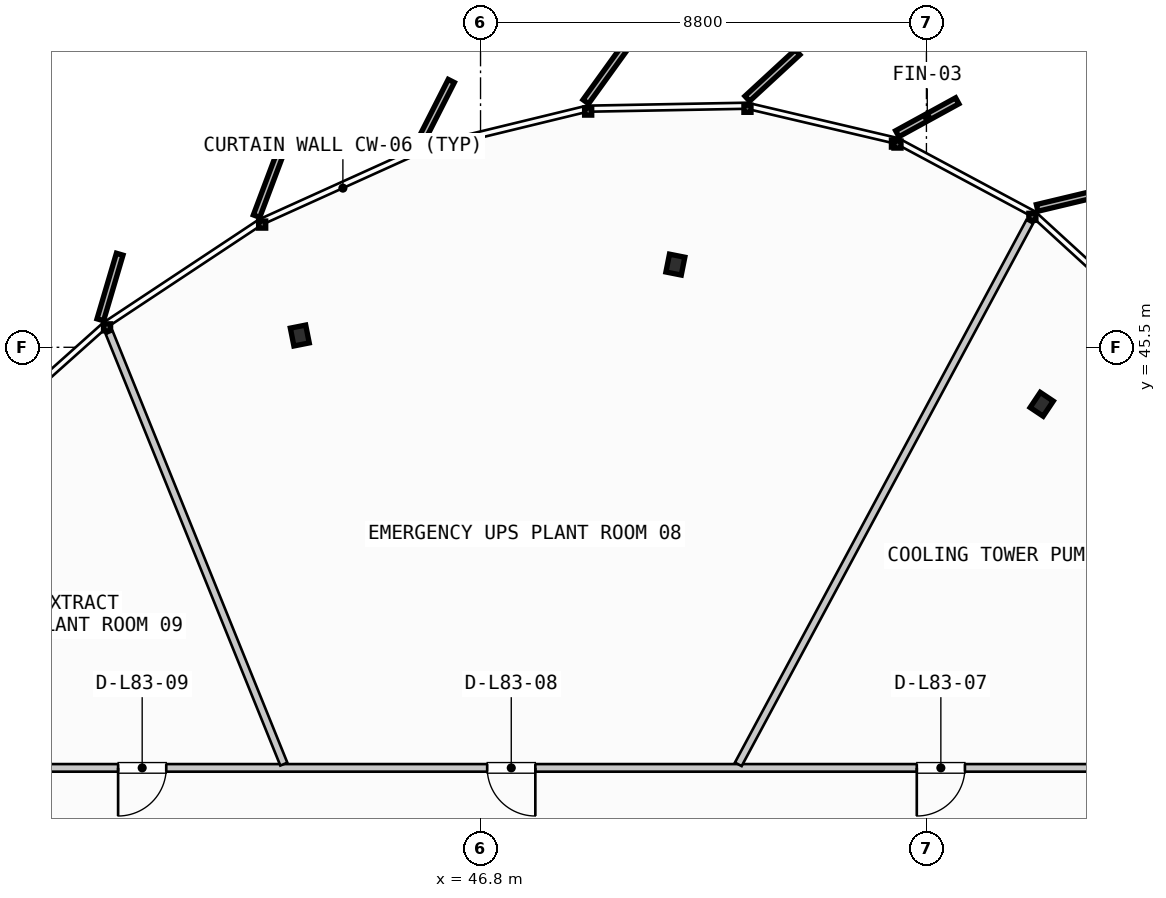
"""IFC4 building model, lengths in metres.
Left out: names, types, materials, properties, quantities, classifications, styles, units other than length and angle.
Written with IfcOpenShell. Run it as: python <this file> out.ifc"""

import sys

from ifc_helpers import new_model, si_unit, direction, frame, frame_2d, origin, origin_2d, place, context, subcontext, project, spatial, rectangle, i_section, extrude, source, transform, mapped, element, fill, save


model = new_model("IFC4")
c1 = context("Model", 3, precision=1e-05, world=origin(), true_north=direction((0.0, 1.0)))
c2 = subcontext(c1, "Body", "Model", "MODEL_VIEW")
j1 = project(units=[si_unit("LENGTHUNIT", "METRE"), si_unit("PLANEANGLEUNIT", "RADIAN")], contexts=[c1])
p1 = place(None, origin())
s1 = spatial("IfcSite", under=j1, at=p1, CompositionType="ELEMENT")
p2 = place(p1, origin())
s2 = spatial("IfcBuilding", under=s1, at=p2, CompositionType="ELEMENT")
p3 = place(p2, frame((0.0, 0.0, 312.3)))
s3 = spatial("IfcBuildingStorey", under=s2, at=p3, CompositionType="ELEMENT", Elevation=312.3)
m1 = source(origin(), c2, "Body", "SweptSolid", [
    extrude(i_section(OverallWidth=0.309, OverallDepth=0.359, WebThickness=0.016, FlangeThickness=0.026, FilletRadius=0.027, at=origin_2d()), origin(), (0.0, 0.0, 1.0), 3.735),
])
for number, where, z_axis, x_axis in (
    (1, (57.875, 44.375, 0.0), (0.0, 0.0, 1.0), (0.556, 0.831, 0.0)),
    (2, (50.645, 47.132, 0.0), (0.0, 0.0, 1.0), (0.195, 0.981, 0.0)),
    (3, (43.233, 45.732, 0.0), (0.0, 0.0, 1.0), (-0.195, 0.981, 0.0)),
):
    element("IfcColumn", number, at=place(p3, frame(where, z_axis=z_axis, x_axis=x_axis)), inside=s3, PredefinedType="COLUMN", context=c2, shape_type="MappedRepresentation", body=[
        mapped(m1, transform((0.0, 0.0, 0.0), scale=1.0)),
    ])
p4 = place(p3, frame((60.5, 37.2, 0.0), z_axis=(0.0, 0.0, 1.0), x_axis=(-1.0, 0.0, 0.0)))
e4 = element("IfcWall", 4, at=p4, inside=s3, PredefinedType="PARTITIONING", context=c2, shape_type="SweptSolid", body=[
    extrude(rectangle(XDim=27.4, YDim=0.15, at=frame_2d((13.7, 0.0))), origin(), (0.0, 0.0, 1.0), 3.26),
])
p5 = place(p4, frame((4.14, 0.0, 0.0)))
e5 = element("IfcOpeningElement", 5, at=p5, cuts=e4, PredefinedType="OPENING", context=c2, shape_type="SweptSolid", body=[
    extrude(rectangle(XDim=0.95, YDim=2.15, at=frame_2d((0.475, 1.075))), frame((0.0, 0.085, 0.0), z_axis=(0.0, -1.0, 0.0), x_axis=(1.0, 0.0, 0.0)), (0.0, 0.0, 1.0), 0.17),
])
p6 = place(p4, frame((12.619, 0.0, 0.0)))
e6 = element("IfcOpeningElement", 6, at=p6, cuts=e4, PredefinedType="OPENING", context=c2, shape_type="SweptSolid", body=[
    extrude(rectangle(XDim=0.95, YDim=2.15, at=frame_2d((0.475, 1.075))), frame((0.0, 0.085, 0.0), z_axis=(0.0, -1.0, 0.0), x_axis=(1.0, 0.0, 0.0)), (0.0, 0.0, 1.0), 0.17),
])
p7 = place(p4, frame((19.903, 0.0, 0.0)))
e7 = element("IfcOpeningElement", 7, at=p7, cuts=e4, PredefinedType="OPENING", context=c2, shape_type="SweptSolid", body=[
    extrude(rectangle(XDim=0.95, YDim=2.15, at=frame_2d((0.475, 1.075))), frame((0.0, 0.085, 0.0), z_axis=(0.0, -1.0, 0.0), x_axis=(1.0, 0.0, 0.0)), (0.0, 0.0, 1.0), 0.17),
])
p8 = place(p3, frame((51.887, 37.271, 0.0), z_axis=(0.0, 0.0, 1.0), x_axis=(0.473223934603, 0.880942170474, 0.0)))
e8 = element("IfcWall", 8, at=p8, inside=s3, PredefinedType="PARTITIONING", context=c2, shape_type="SweptSolid", body=[
    extrude(rectangle(XDim=12.154, YDim=0.15, at=frame_2d((6.077, 0.0))), origin(), (0.0, 0.0, 1.0), 3.26),
])
p9 = place(p3, frame((42.918, 37.274, 0.0), z_axis=(0.0, 0.0, 1.0), x_axis=(-0.375226458989, 0.926933171526, 0.0)))
e9 = element("IfcWall", 9, at=p9, inside=s3, PredefinedType="PARTITIONING", context=c2, shape_type="SweptSolid", body=[
    extrude(rectangle(XDim=9.188, YDim=0.15, at=frame_2d((4.594, 0.0))), origin(), (0.0, 0.0, 1.0), 3.26),
])
m2 = source(origin(), c2, "Body", "SweptSolid", [
    extrude(rectangle(XDim=0.95, YDim=2.15, at=frame_2d((0.475, 1.075))), frame((0.0, 0.025, 0.0), z_axis=(0.0, -1.0, 0.0), x_axis=(1.0, 0.0, 0.0)), (0.0, 0.0, 1.0), 0.05),
])
p10 = place(p5, origin())
e10 = element("IfcDoor", 10, at=p10, inside=s3, OperationType="SINGLE_SWING_RIGHT", PredefinedType="DOOR", context=c2, shape_type="MappedRepresentation", body=[
    mapped(m2, transform((0.0, 0.0, 0.0), scale=1.0)),
])
fill(e5, e10)
p11 = place(p6, origin())
e11 = element("IfcDoor", 11, at=p11, inside=s3, OperationType="SINGLE_SWING_LEFT", PredefinedType="DOOR", context=c2, shape_type="MappedRepresentation", body=[
    mapped(m2, transform((0.0, 0.0, 0.0), scale=1.0)),
])
fill(e6, e11)
p12 = place(p7, origin())
e12 = element("IfcDoor", 12, at=p12, inside=s3, OperationType="SINGLE_SWING_RIGHT", PredefinedType="DOOR", context=c2, shape_type="MappedRepresentation", body=[
    mapped(m2, transform((0.0, 0.0, 0.0), scale=1.0)),
])
fill(e7, e12)
save(model, sys.argv[1])
